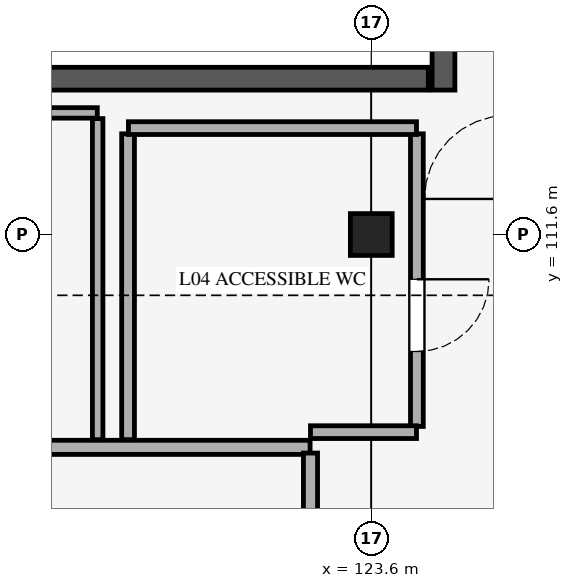
"""IFC4 building model, lengths in metres.
Left out: names, types, materials, properties, quantities, classifications, styles, units other than length and angle.
Written with IfcOpenShell. Run it as: python <this file> out.ifc"""

import sys

from ifc_helpers import new_model, si_unit, direction, frame, frame_2d, origin, origin_2d, place, context, subcontext, project, spatial, rectangle, extrude, element, fill, save


model = new_model("IFC4")
c1 = context("Model", 3, precision=1e-05, world=origin(), true_north=direction((0.0, 1.0)))
c2 = subcontext(c1, "Body", "Model", "MODEL_VIEW")
j1 = project(units=[si_unit("LENGTHUNIT", "METRE"), si_unit("PLANEANGLEUNIT", "RADIAN")], contexts=[c1])
p1 = place(None, origin())
s1 = spatial("IfcSite", under=j1, at=p1, CompositionType="ELEMENT")
p2 = place(p1, origin())
s2 = spatial("IfcBuilding", under=s1, at=p2, CompositionType="ELEMENT")
p3 = place(p2, frame((0.0, 0.0, 17.4)))
s3 = spatial("IfcBuildingStorey", under=s2, at=p3, CompositionType="ELEMENT", Elevation=17.4)
p4 = place(p3, frame((123.6, 111.6, 0.0), z_axis=(0.0, 0.0, 1.0), x_axis=(1.0, 0.0, 0.0)))
e1 = element("IfcColumn", 1, at=p4, inside=s3, PredefinedType="COLUMN", context=c2, shape_type="SweptSolid", body=[
    extrude(rectangle(XDim=0.55, YDim=0.55, at=origin_2d()), origin(), (0.0, 0.0, 1.0), 4.2),
])
p5 = place(p3, frame((116.25, 113.65, 0.0), z_axis=(0.0, 0.0, 1.0), x_axis=(1.0, 0.0, 0.0)))
e2 = element("IfcWall", 2, at=p5, inside=s3, PredefinedType="SHEAR", context=c2, shape_type="SweptSolid", body=[
    extrude(rectangle(XDim=8.1, YDim=0.3, at=frame_2d((4.05, 0.0))), origin(), (0.0, 0.0, 1.0), 3.98),
])
p6 = place(p3, frame((124.55, 113.5, 0.0), z_axis=(0.0, 0.0, 1.0), x_axis=(0.0, 1.0, 0.0)))
e3 = element("IfcWall", 3, at=p6, inside=s3, PredefinedType="SHEAR", context=c2, shape_type="SweptSolid", body=[
    extrude(rectangle(XDim=3.9, YDim=0.3, at=frame_2d((1.95, 0.0))), origin(), (0.0, 0.0, 1.0), 3.98),
])
p7 = place(p3, frame((114.205, 108.8, 0.0), z_axis=(0.0, 0.0, 1.0), x_axis=(1.0, 0.0, 0.0)))
e4 = element("IfcWall", 4, at=p7, inside=s3, PredefinedType="STANDARD", context=c2, shape_type="SweptSolid", body=[
    extrude(rectangle(XDim=8.59, YDim=0.186, at=frame_2d((4.295, 0.0))), origin(), (0.0, 0.0, 1.0), 3.755),
])
p8 = place(p3, frame((122.8, 108.725, 0.0), z_axis=(0.0, 0.0, 1.0), x_axis=(0.0, -1.0, 0.0)))
e5 = element("IfcWall", 5, at=p8, inside=s3, PredefinedType="STANDARD", context=c2, shape_type="SweptSolid", body=[
    extrude(rectangle(XDim=5.45, YDim=0.186, at=frame_2d((2.725, 0.0))), origin(), (0.0, 0.0, 1.0), 3.305),
])
p9 = place(p8, frame((2.0, 0.0, 0.0)))
e6 = element("IfcOpeningElement", 6, at=p9, cuts=e5, PredefinedType="OPENING", context=c2, shape_type="SweptSolid", body=[
    extrude(rectangle(XDim=1.45, YDim=2.22, at=frame_2d((0.725, 1.11))), frame((0.0, 0.103, 0.0), z_axis=(0.0, -1.0, 0.0), x_axis=(1.0, 0.0, 0.0)), (0.0, 0.0, 1.0), 0.206),
])
p10 = place(p3, frame((120.0, 113.125, 0.0), z_axis=(0.0, 0.0, 1.0), x_axis=(0.0, -1.0, 0.0)))
e7 = element("IfcWall", 7, at=p10, inside=s3, PredefinedType="STANDARD", context=c2, shape_type="SweptSolid", body=[
    extrude(rectangle(XDim=4.224, YDim=0.138, at=frame_2d((2.112, 0.0))), origin(), (0.0, 0.0, 1.0), 3.305),
])
p11 = place(p3, frame((114.205, 113.2, 0.0), z_axis=(0.0, 0.0, 1.0), x_axis=(1.0, 0.0, 0.0)))
e8 = element("IfcWall", 8, at=p11, inside=s3, PredefinedType="STANDARD", context=c2, shape_type="SweptSolid", body=[
    extrude(rectangle(XDim=5.79, YDim=0.138, at=frame_2d((2.895, 0.0))), origin(), (0.0, 0.0, 1.0), 3.755),
])
p12 = place(p11, frame((0.489, 0.0, 0.0)))
e9 = element("IfcOpeningElement", 9, at=p12, cuts=e8, PredefinedType="OPENING", context=c2, shape_type="SweptSolid", body=[
    extrude(rectangle(XDim=0.9, YDim=2.1, at=frame_2d((0.45, 1.05))), frame((0.0, 0.079, 0.0), z_axis=(0.0, -1.0, 0.0), x_axis=(1.0, 0.0, 0.0)), (0.0, 0.0, 1.0), 0.158),
])
p13 = place(p3, frame((124.2, 112.925, 0.0), z_axis=(0.0, 0.0, 1.0), x_axis=(0.0, -1.0, 0.0)))
e10 = element("IfcWall", 10, at=p13, inside=s3, PredefinedType="STANDARD", context=c2, shape_type="SweptSolid", body=[
    extrude(rectangle(XDim=3.85, YDim=0.168, at=frame_2d((1.925, 0.0))), origin(), (0.0, 0.0, 1.0), 3.98),
])
p14 = place(p13, frame((1.914, 0.0, 0.0)))
e11 = element("IfcOpeningElement", 11, at=p14, cuts=e10, PredefinedType="OPENING", context=c2, shape_type="SweptSolid", body=[
    extrude(rectangle(XDim=0.95, YDim=2.1, at=frame_2d((0.475, 1.05))), frame((0.0, 0.094, 0.0), z_axis=(0.0, -1.0, 0.0), x_axis=(1.0, 0.0, 0.0)), (0.0, 0.0, 1.0), 0.188),
])
p15 = place(p3, frame((124.195, 109.0, 0.0), z_axis=(0.0, 0.0, 1.0), x_axis=(-1.0, 0.0, 0.0)))
e12 = element("IfcWall", 12, at=p15, inside=s3, PredefinedType="STANDARD", context=c2, shape_type="SweptSolid", body=[
    extrude(rectangle(XDim=1.395, YDim=0.168, at=frame_2d((0.698, 0.0))), origin(), (0.0, 0.0, 1.0), 3.98),
])
p16 = place(p3, frame((120.4, 108.901, 0.0), z_axis=(0.0, 0.0, 1.0), x_axis=(0.0, 1.0, 0.0)))
e13 = element("IfcWall", 13, at=p16, inside=s3, PredefinedType="STANDARD", context=c2, shape_type="SweptSolid", body=[
    extrude(rectangle(XDim=4.024, YDim=0.168, at=frame_2d((2.012, 0.0))), origin(), (0.0, 0.0, 1.0), 3.305),
])
p17 = place(p3, frame((120.405, 113.0, 0.0), z_axis=(0.0, 0.0, 1.0), x_axis=(1.0, 0.0, 0.0)))
e14 = element("IfcWall", 14, at=p17, inside=s3, PredefinedType="STANDARD", context=c2, shape_type="SweptSolid", body=[
    extrude(rectangle(XDim=3.79, YDim=0.168, at=frame_2d((1.895, 0.0))), origin(), (0.0, 0.0, 1.0), 3.98),
])
p18 = place(p14, origin())
e15 = element("IfcDoor", 15, at=p18, inside=s3, OperationType="SINGLE_SWING_LEFT", PredefinedType="DOOR", context=c2, shape_type="SweptSolid", body=[
    extrude(rectangle(XDim=0.95, YDim=2.1, at=frame_2d((0.475, 1.05))), frame((0.0, 0.025, 0.0), z_axis=(0.0, -1.0, 0.0), x_axis=(1.0, 0.0, 0.0)), (0.0, 0.0, 1.0), 0.05),
])
fill(e11, e15)
save(model, sys.argv[1])
